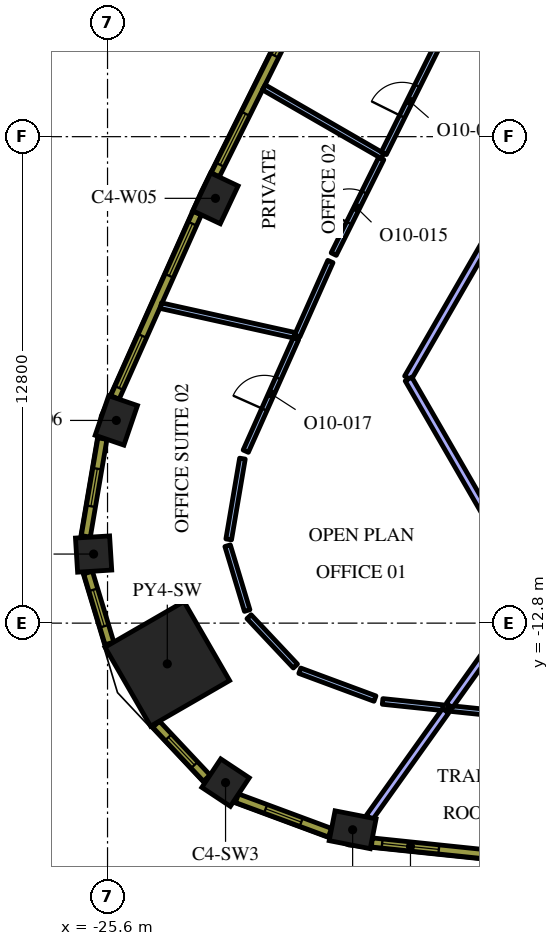
"""IFC4 building model, lengths in metres.
Left out: names, types, materials, properties, quantities, classifications, styles, units other than length and angle.
Written with IfcOpenShell. Run it as: python <this file> out.ifc"""

import sys

from ifc_helpers import new_model, si_unit, direction, frame, frame_2d, origin, origin_2d, place, context, subcontext, project, spatial, rectangle, extrude, element, fill, save


model = new_model("IFC4")
c1 = context("Model", 3, precision=1e-05, world=origin(), true_north=direction((0.0, 1.0)))
c2 = subcontext(c1, "Body", "Model", "MODEL_VIEW")
j1 = project(units=[si_unit("LENGTHUNIT", "METRE"), si_unit("PLANEANGLEUNIT", "RADIAN")], contexts=[c1])
p1 = place(None, origin())
s1 = spatial("IfcSite", under=j1, at=p1, CompositionType="ELEMENT")
p2 = place(p1, origin())
s2 = spatial("IfcBuilding", under=s1, at=p2, CompositionType="ELEMENT")
p3 = place(p2, frame((0.0, 0.0, 252.0)))
s3 = spatial("IfcBuildingStorey", under=s2, at=p3, CompositionType="ELEMENT", Elevation=252.0)
p4 = place(p3, frame((-24.027, -13.872, 0.0), z_axis=(0.0, 0.0, 1.0), x_axis=(-0.866025403784, -0.5, 0.0)))
e1 = element("IfcColumn", 1, at=p4, inside=s3, PredefinedType="COLUMN", context=c2, shape_type="SweptSolid", body=[
    extrude(rectangle(XDim=2.4, YDim=2.4, at=origin_2d()), origin(), (0.0, 0.0, 1.0), 4.2),
])
for number, where, z_axis, x_axis in (
    (2, (-19.15, -18.237, 0.0), (0.0, 0.0, 1.0), (0.981, -0.192, 0.0)),
    (3, (-22.76, -1.623, 0.0), (0.0, 0.0, 1.0), (-0.426, -0.905, 0.0)),
    (4, (-25.369, -7.466, 0.0), (0.0, 0.0, 1.0), (-0.324, -0.946, 0.0)),
):
    element("IfcColumn", number, at=place(p3, frame(where, z_axis=z_axis, x_axis=x_axis)), inside=s3, PredefinedType="COLUMN", context=c2, shape_type="SweptSolid", body=[
        extrude(rectangle(XDim=1.1, YDim=0.8, at=origin_2d()), origin(), (0.0, 0.0, 1.0), 4.2),
    ])
for number, where, z_axis, x_axis in (
    (5, (-25.967, -10.982, 0.0), (0.0, 0.0, 1.0), (0.062, -0.998, 0.0)),
    (6, (-22.494, -16.997, 0.0), (0.0, 0.0, 1.0), (0.833, -0.553, 0.0)),
):
    element("IfcColumn", number, at=place(p3, frame(where, z_axis=z_axis, x_axis=x_axis)), inside=s3, PredefinedType="COLUMN", context=c2, shape_type="SweptSolid", body=[
        extrude(rectangle(XDim=0.9, YDim=0.9, at=origin_2d()), origin(), (0.0, 0.0, 1.0), 4.2),
    ])
p5 = place(p3, frame((-12.5, -15.471, 0.0), z_axis=(0.0, 0.0, 1.0), x_axis=(-0.99462267413, 0.103565129778, 0.0)))
e7 = element("IfcWall", 7, at=p5, inside=s3, PredefinedType="PARTITIONING", context=c2, shape_type="SweptSolid", body=[
    extrude(rectangle(XDim=4.177, YDim=0.15, at=frame_2d((2.089, 0.0))), origin(), (0.0, 0.0, 1.0), 3.4),
])
p6 = place(p5, frame((1.677, 0.0, 0.0)))
e8 = element("IfcOpeningElement", 8, at=p6, cuts=e7, PredefinedType="OPENING", context=c2, shape_type="SweptSolid", body=[
    extrude(rectangle(XDim=0.9, YDim=2.1, at=frame_2d((0.45, 1.05))), frame((0.0, 0.085, 0.0), z_axis=(0.0, -1.0, 0.0), x_axis=(1.0, 0.0, 0.0)), (0.0, 0.0, 1.0), 0.17),
])
p7 = place(p3, frame((-18.709, -17.916, 0.0), z_axis=(0.0, 0.0, 1.0), x_axis=(0.581023923954, 0.813886478444, 0.0)))
e9 = element("IfcWall", 9, at=p7, inside=s3, PredefinedType="PARTITIONING", context=c2, shape_type="SweptSolid", body=[
    extrude(rectangle(XDim=3.449, YDim=0.2, at=frame_2d((1.725, 0.0))), origin(), (0.0, 0.0, 1.0), 3.4),
])
p8 = place(p3, frame((-16.604, -14.968, 0.0), z_axis=(0.0, 0.0, 1.0), x_axis=(0.581000735813, 0.813903031684, 0.0)))
e10 = element("IfcWall", 10, at=p8, inside=s3, PredefinedType="PARTITIONING", context=c2, shape_type="SweptSolid", body=[
    extrude(rectangle(XDim=3.696, YDim=0.2, at=frame_2d((1.848, 0.0))), origin(), (0.0, 0.0, 1.0), 3.4),
])
p9 = place(p3, frame((-18.363, -0.506, 0.0), z_axis=(0.0, 0.0, 1.0), x_axis=(-0.866048087663, 0.499960708312, 0.0)))
e11 = element("IfcWall", 11, at=p9, inside=s3, PredefinedType="PARTITIONING", context=c2, shape_type="SweptSolid", body=[
    extrude(rectangle(XDim=3.607, YDim=0.15, at=frame_2d((1.804, 0.0))), origin(), (0.0, 0.0, 1.0), 3.4),
])
p10 = place(p3, frame((-18.33, -0.438, 0.0), z_axis=(0.0, 0.0, 1.0), x_axis=(0.445184199442, 0.895439014432, 0.0)))
e12 = element("IfcWall", 12, at=p10, inside=s3, PredefinedType="PARTITIONING", context=c2, shape_type="SweptSolid", body=[
    extrude(rectangle(XDim=3.082, YDim=0.15, at=frame_2d((1.541, 0.0))), origin(), (0.0, 0.0, 1.0), 3.4),
])
p11 = place(p10, frame((1.081, 0.0, 0.0)))
e13 = element("IfcOpeningElement", 13, at=p11, cuts=e12, PredefinedType="OPENING", context=c2, shape_type="SweptSolid", body=[
    extrude(rectangle(XDim=0.9, YDim=2.1, at=frame_2d((0.45, 1.05))), frame((0.0, 0.085, 0.0), z_axis=(0.0, -1.0, 0.0), x_axis=(1.0, 0.0, 0.0)), (0.0, 0.0, 1.0), 0.17),
])
p12 = place(p3, frame((-19.648, -3.09, 0.0), z_axis=(0.0, 0.0, 1.0), x_axis=(0.445162501923, 0.89544980143, 0.0)))
e14 = element("IfcWall", 14, at=p12, inside=s3, PredefinedType="PARTITIONING", context=c2, shape_type="SweptSolid", body=[
    extrude(rectangle(XDim=2.811, YDim=0.15, at=frame_2d((1.405, 0.0))), origin(), (0.0, 0.0, 1.0), 3.4),
])
p13 = place(p12, frame((0.911, 0.0, 0.0)))
e15 = element("IfcOpeningElement", 15, at=p13, cuts=e14, PredefinedType="OPENING", context=c2, shape_type="SweptSolid", body=[
    extrude(rectangle(XDim=0.9, YDim=2.1, at=frame_2d((0.45, 1.05))), frame((0.0, 0.085, 0.0), z_axis=(0.0, -1.0, 0.0), x_axis=(1.0, 0.0, 0.0)), (0.0, 0.0, 1.0), 0.17),
])
p14 = place(p3, frame((-19.735, -3.286, 0.0), z_axis=(0.0, 0.0, 1.0), x_axis=(-0.407596561527, -0.913162112131, 0.0)))
e16 = element("IfcWall", 16, at=p14, inside=s3, PredefinedType="PARTITIONING", context=c2, shape_type="SweptSolid", body=[
    extrude(rectangle(XDim=2.143, YDim=0.15, at=frame_2d((1.072, 0.0))), origin(), (0.0, 0.0, 1.0), 3.4),
])
p15 = place(p3, frame((-20.684, -5.226, 0.0), z_axis=(0.0, 0.0, 1.0), x_axis=(-0.976260449593, 0.216599941274, 0.0)))
e17 = element("IfcWall", 17, at=p15, inside=s3, PredefinedType="PARTITIONING", context=c2, shape_type="SweptSolid", body=[
    extrude(rectangle(XDim=3.598, YDim=0.15, at=frame_2d((1.799, 0.0))), origin(), (0.0, 0.0, 1.0), 3.4),
])
p16 = place(p3, frame((-16.769, -15.026, 0.0), z_axis=(0.0, 0.0, 1.0), x_axis=(-0.994627569422, 0.103518105401, 0.0)))
e18 = element("IfcWall", 18, at=p16, inside=s3, PredefinedType="PARTITIONING", context=c2, shape_type="SweptSolid", body=[
    extrude(rectangle(XDim=1.601, YDim=0.15, at=frame_2d((0.801, 0.0))), origin(), (0.0, 0.0, 1.0), 3.4),
])
p17 = place(p3, frame((-18.562, -14.786, 0.0), z_axis=(0.0, 0.0, 1.0), x_axis=(-0.937602119917, 0.347710029662, 0.0)))
e19 = element("IfcWall", 19, at=p17, inside=s3, PredefinedType="PARTITIONING", context=c2, shape_type="SweptSolid", body=[
    extrude(rectangle(XDim=2.11, YDim=0.15, at=frame_2d((1.055, 0.0))), origin(), (0.0, 0.0, 1.0), 3.4),
])
p18 = place(p3, frame((-20.656, -13.929, 0.0), z_axis=(0.0, 0.0, 1.0), x_axis=(-0.684710738871, 0.728814931293, 0.0)))
e20 = element("IfcWall", 20, at=p18, inside=s3, PredefinedType="PARTITIONING", context=c2, shape_type="SweptSolid", body=[
    extrude(rectangle(XDim=1.782, YDim=0.15, at=frame_2d((0.891, 0.0))), origin(), (0.0, 0.0, 1.0), 3.4),
])
p19 = place(p3, frame((-21.925, -12.469, 0.0), z_axis=(0.0, 0.0, 1.0), x_axis=(-0.288767705809, 0.957399191603, 0.0)))
e21 = element("IfcWall", 21, at=p19, inside=s3, PredefinedType="PARTITIONING", context=c2, shape_type="SweptSolid", body=[
    extrude(rectangle(XDim=1.782, YDim=0.15, at=frame_2d((0.891, 0.0))), origin(), (0.0, 0.0, 1.0), 3.4),
])
p20 = place(p3, frame((-22.412, -10.597, 0.0), z_axis=(0.0, 0.0, 1.0), x_axis=(0.167612004459, 0.985853039738, 0.0)))
e22 = element("IfcWall", 22, at=p20, inside=s3, PredefinedType="PARTITIONING", context=c2, shape_type="SweptSolid", body=[
    extrude(rectangle(XDim=2.156, YDim=0.15, at=frame_2d((1.078, 0.0))), origin(), (0.0, 0.0, 1.0), 3.4),
])
p21 = place(p3, frame((-21.963, -8.276, 0.0), z_axis=(0.0, 0.0, 1.0), x_axis=(0.407560214661, 0.913178334952, 0.0)))
e23 = element("IfcWall", 23, at=p21, inside=s3, PredefinedType="PARTITIONING", context=c2, shape_type="SweptSolid", body=[
    extrude(rectangle(XDim=3.249, YDim=0.15, at=frame_2d((1.625, 0.0))), origin(), (0.0, 0.0, 1.0), 3.4),
])
p22 = place(p21, frame((1.2, 0.0, 0.0)))
e24 = element("IfcOpeningElement", 24, at=p22, cuts=e23, PredefinedType="OPENING", context=c2, shape_type="SweptSolid", body=[
    extrude(rectangle(XDim=0.9, YDim=2.1, at=frame_2d((0.45, 1.05))), frame((0.0, 0.085, 0.0), z_axis=(0.0, -1.0, 0.0), x_axis=(1.0, 0.0, 0.0)), (0.0, 0.0, 1.0), 0.17),
])
p23 = place(p3, frame((-13.537, 0.853, 0.0), z_axis=(0.0, 0.0, 1.0), x_axis=(-0.500009576767, -0.866019874565, 0.0)))
e25 = element("IfcWall", 25, at=p23, inside=s3, PredefinedType="PARTITIONING", context=c2, shape_type="SweptSolid", body=[
    extrude(rectangle(XDim=8.317, YDim=0.2, at=frame_2d((4.159, 0.0))), origin(), (0.0, 0.0, 1.0), 3.4),
])
p24 = place(p3, frame((-17.681, -6.376, 0.0), z_axis=(0.0, 0.0, 1.0), x_axis=(0.500017005442, -0.866015585465, 0.0)))
e26 = element("IfcWall", 26, at=p24, inside=s3, PredefinedType="PARTITIONING", context=c2, shape_type="SweptSolid", body=[
    extrude(rectangle(XDim=6.338, YDim=0.2, at=frame_2d((3.169, 0.0))), origin(), (0.0, 0.0, 1.0), 3.4),
])
p25 = place(p3, frame((-18.644, -18.571, 0.0), z_axis=(0.0, 0.0, 1.0), x_axis=(0.994621961215, -0.103571976272, 0.0)))
e27 = element("IfcWall", 27, at=p25, inside=s3, PredefinedType="SOLIDWALL", context=c2, shape_type="SweptSolid", body=[
    extrude(rectangle(XDim=5.311, YDim=0.24, at=frame_2d((2.655, 0.0))), origin(), (0.0, 0.0, 1.0), 3.9),
])
p26 = place(p25, frame((0.271, 0.0, 0.9)))
e28 = element("IfcOpeningElement", 28, at=p26, cuts=e27, PredefinedType="OPENING", context=c2, shape_type="SweptSolid", body=[
    extrude(rectangle(XDim=1.5, YDim=2.55, at=frame_2d((0.75, 1.275))), frame((0.0, 0.13, 0.0), z_axis=(0.0, -1.0, 0.0), x_axis=(1.0, 0.0, 0.0)), (0.0, 0.0, 1.0), 0.26),
])
p27 = place(p25, frame((3.504, 0.0, 0.9)))
e29 = element("IfcOpeningElement", 29, at=p27, cuts=e27, PredefinedType="OPENING", context=c2, shape_type="SweptSolid", body=[
    extrude(rectangle(XDim=1.5, YDim=2.55, at=frame_2d((0.75, 1.275))), frame((0.0, 0.13, 0.0), z_axis=(0.0, -1.0, 0.0), x_axis=(1.0, 0.0, 0.0)), (0.0, 0.0, 1.0), 0.26),
])
p28 = place(p3, frame((-20.407, 3.74, 0.0), z_axis=(0.0, 0.0, 1.0), x_axis=(-0.445129582031, -0.895466166419, 0.0)))
e30 = element("IfcWall", 30, at=p28, inside=s3, PredefinedType="SOLIDWALL", context=c2, shape_type="SweptSolid", body=[
    extrude(rectangle(XDim=5.298, YDim=0.24, at=frame_2d((2.649, 0.0))), origin(), (0.0, 0.0, 1.0), 3.9),
])
p29 = place(p28, frame((0.295, 0.0, 0.9)))
e31 = element("IfcOpeningElement", 31, at=p29, cuts=e30, PredefinedType="OPENING", context=c2, shape_type="SweptSolid", body=[
    extrude(rectangle(XDim=1.5, YDim=2.55, at=frame_2d((0.75, 1.275))), frame((0.0, 0.13, 0.0), z_axis=(0.0, -1.0, 0.0), x_axis=(1.0, 0.0, 0.0)), (0.0, 0.0, 1.0), 0.26),
])
p30 = place(p28, frame((3.504, 0.0, 0.9)))
e32 = element("IfcOpeningElement", 32, at=p30, cuts=e30, PredefinedType="OPENING", context=c2, shape_type="SweptSolid", body=[
    extrude(rectangle(XDim=1.5, YDim=2.55, at=frame_2d((0.75, 1.275))), frame((0.0, 0.13, 0.0), z_axis=(0.0, -1.0, 0.0), x_axis=(1.0, 0.0, 0.0)), (0.0, 0.0, 1.0), 0.26),
])
p31 = place(p3, frame((-23.24, -2.011, 0.0), z_axis=(0.0, 0.0, 1.0), x_axis=(-0.407579651789, -0.913169659728, 0.0)))
e33 = element("IfcWall", 33, at=p31, inside=s3, PredefinedType="SOLIDWALL", context=c2, shape_type="SweptSolid", body=[
    extrude(rectangle(XDim=5.311, YDim=0.24, at=frame_2d((2.655, 0.0))), origin(), (0.0, 0.0, 1.0), 3.9),
])
p32 = place(p31, frame((0.306, 0.0, 0.9)))
e34 = element("IfcOpeningElement", 34, at=p32, cuts=e33, PredefinedType="OPENING", context=c2, shape_type="SweptSolid", body=[
    extrude(rectangle(XDim=1.5, YDim=2.55, at=frame_2d((0.75, 1.275))), frame((0.0, 0.13, 0.0), z_axis=(0.0, -1.0, 0.0), x_axis=(1.0, 0.0, 0.0)), (0.0, 0.0, 1.0), 0.26),
])
p33 = place(p31, frame((3.539, 0.0, 0.9)))
e35 = element("IfcOpeningElement", 35, at=p33, cuts=e33, PredefinedType="OPENING", context=c2, shape_type="SweptSolid", body=[
    extrude(rectangle(XDim=1.5, YDim=2.55, at=frame_2d((0.75, 1.275))), frame((0.0, 0.13, 0.0), z_axis=(0.0, -1.0, 0.0), x_axis=(1.0, 0.0, 0.0)), (0.0, 0.0, 1.0), 0.26),
])
p34 = place(p3, frame((-25.734, -7.945, 0.0), z_axis=(0.0, 0.0, 1.0), x_axis=(-0.167660055546, -0.985844869021, 0.0)))
e36 = element("IfcWall", 36, at=p34, inside=s3, PredefinedType="SOLIDWALL", context=c2, shape_type="SweptSolid", body=[
    extrude(rectangle(XDim=2.609, YDim=0.24, at=frame_2d((1.305, 0.0))), origin(), (0.0, 0.0, 1.0), 3.9),
])
p35 = place(p34, frame((0.805, 0.0, 0.9)))
e37 = element("IfcOpeningElement", 37, at=p35, cuts=e36, PredefinedType="OPENING", context=c2, shape_type="SweptSolid", body=[
    extrude(rectangle(XDim=1.0, YDim=2.55, at=frame_2d((0.5, 1.275))), frame((0.0, 0.13, 0.0), z_axis=(0.0, -1.0, 0.0), x_axis=(1.0, 0.0, 0.0)), (0.0, 0.0, 1.0), 0.26),
])
p36 = place(p3, frame((-26.112, -11.469, 0.0), z_axis=(0.0, 0.0, 1.0), x_axis=(0.288727209095, -0.957411405159, 0.0)))
e38 = element("IfcWall", 38, at=p36, inside=s3, PredefinedType="SOLIDWALL", context=c2, shape_type="SweptSolid", body=[
    extrude(rectangle(XDim=1.948, YDim=0.24, at=frame_2d((0.974, 0.0))), origin(), (0.0, 0.0, 1.0), 3.9),
])
p37 = place(p36, frame((0.474, 0.0, 0.9)))
e39 = element("IfcOpeningElement", 39, at=p37, cuts=e38, PredefinedType="OPENING", context=c2, shape_type="SweptSolid", body=[
    extrude(rectangle(XDim=1.0, YDim=2.55, at=frame_2d((0.5, 1.275))), frame((0.0, 0.13, 0.0), z_axis=(0.0, -1.0, 0.0), x_axis=(1.0, 0.0, 0.0)), (0.0, 0.0, 1.0), 0.26),
])
p38 = place(p3, frame((-24.323, -15.459, 0.0), z_axis=(0.0, 0.0, 1.0), x_axis=(0.684770274166, -0.728758994194, 0.0)))
e40 = element("IfcWall", 40, at=p38, inside=s3, PredefinedType="SOLIDWALL", context=c2, shape_type="SweptSolid", body=[
    extrude(rectangle(XDim=1.948, YDim=0.24, at=frame_2d((0.974, 0.0))), origin(), (0.0, 0.0, 1.0), 3.9),
])
p39 = place(p38, frame((0.474, 0.0, 0.9)))
e41 = element("IfcOpeningElement", 41, at=p39, cuts=e40, PredefinedType="OPENING", context=c2, shape_type="SweptSolid", body=[
    extrude(rectangle(XDim=1.0, YDim=2.55, at=frame_2d((0.5, 1.275))), frame((0.0, 0.13, 0.0), z_axis=(0.0, -1.0, 0.0), x_axis=(1.0, 0.0, 0.0)), (0.0, 0.0, 1.0), 0.26),
])
p40 = place(p3, frame((-22.194, -17.406, 0.0), z_axis=(0.0, 0.0, 1.0), x_axis=(0.937569171184, -0.347798863203, 0.0)))
e42 = element("IfcWall", 42, at=p40, inside=s3, PredefinedType="SOLIDWALL", context=c2, shape_type="SweptSolid", body=[
    extrude(rectangle(XDim=2.609, YDim=0.24, at=frame_2d((1.305, 0.0))), origin(), (0.0, 0.0, 1.0), 3.9),
])
p41 = place(p40, frame((0.805, 0.0, 0.9)))
e43 = element("IfcOpeningElement", 43, at=p41, cuts=e42, PredefinedType="OPENING", context=c2, shape_type="SweptSolid", body=[
    extrude(rectangle(XDim=1.0, YDim=2.55, at=frame_2d((0.5, 1.275))), frame((0.0, 0.13, 0.0), z_axis=(0.0, -1.0, 0.0), x_axis=(1.0, 0.0, 0.0)), (0.0, 0.0, 1.0), 0.26),
])
p42 = place(p11, origin())
e44 = element("IfcDoor", 44, at=p42, inside=s3, OperationType="SINGLE_SWING_LEFT", PredefinedType="DOOR", context=c2, shape_type="SweptSolid", body=[
    extrude(rectangle(XDim=0.9, YDim=2.1, at=frame_2d((0.45, 1.05))), frame((0.0, 0.025, 0.0), z_axis=(0.0, -1.0, 0.0), x_axis=(1.0, 0.0, 0.0)), (0.0, 0.0, 1.0), 0.05),
])
fill(e13, e44)
p43 = place(p13, origin())
e45 = element("IfcDoor", 45, at=p43, inside=s3, OperationType="SINGLE_SWING_LEFT", PredefinedType="DOOR", context=c2, shape_type="SweptSolid", body=[
    extrude(rectangle(XDim=0.9, YDim=2.1, at=frame_2d((0.45, 1.05))), frame((0.0, 0.025, 0.0), z_axis=(0.0, -1.0, 0.0), x_axis=(1.0, 0.0, 0.0)), (0.0, 0.0, 1.0), 0.05),
])
fill(e15, e45)
p44 = place(p22, origin())
e46 = element("IfcDoor", 46, at=p44, inside=s3, OperationType="SINGLE_SWING_RIGHT", PredefinedType="DOOR", context=c2, shape_type="SweptSolid", body=[
    extrude(rectangle(XDim=0.9, YDim=2.1, at=frame_2d((0.45, 1.05))), frame((0.0, 0.025, 0.0), z_axis=(0.0, -1.0, 0.0), x_axis=(1.0, 0.0, 0.0)), (0.0, 0.0, 1.0), 0.05),
])
fill(e24, e46)
p45 = place(p26, origin())
e47 = element("IfcWindow", 47, at=p45, inside=s3, PartitioningType="SINGLE_PANEL", PredefinedType="WINDOW", context=c2, shape_type="SweptSolid", body=[
    extrude(rectangle(XDim=1.5, YDim=2.55, at=frame_2d((0.75, 1.275))), frame((0.0, 0.04, 0.0), z_axis=(0.0, -1.0, 0.0), x_axis=(1.0, 0.0, 0.0)), (0.0, 0.0, 1.0), 0.06),
])
fill(e28, e47)
p46 = place(p29, origin())
e48 = element("IfcWindow", 48, at=p46, inside=s3, PartitioningType="SINGLE_PANEL", PredefinedType="WINDOW", context=c2, shape_type="SweptSolid", body=[
    extrude(rectangle(XDim=1.5, YDim=2.55, at=frame_2d((0.75, 1.275))), frame((0.0, 0.04, 0.0), z_axis=(0.0, -1.0, 0.0), x_axis=(1.0, 0.0, 0.0)), (0.0, 0.0, 1.0), 0.06),
])
fill(e31, e48)
p47 = place(p30, origin())
e49 = element("IfcWindow", 49, at=p47, inside=s3, PartitioningType="SINGLE_PANEL", PredefinedType="WINDOW", context=c2, shape_type="SweptSolid", body=[
    extrude(rectangle(XDim=1.5, YDim=2.55, at=frame_2d((0.75, 1.275))), frame((0.0, 0.04, 0.0), z_axis=(0.0, -1.0, 0.0), x_axis=(1.0, 0.0, 0.0)), (0.0, 0.0, 1.0), 0.06),
])
fill(e32, e49)
p48 = place(p32, origin())
e50 = element("IfcWindow", 50, at=p48, inside=s3, PartitioningType="SINGLE_PANEL", PredefinedType="WINDOW", context=c2, shape_type="SweptSolid", body=[
    extrude(rectangle(XDim=1.5, YDim=2.55, at=frame_2d((0.75, 1.275))), frame((0.0, 0.04, 0.0), z_axis=(0.0, -1.0, 0.0), x_axis=(1.0, 0.0, 0.0)), (0.0, 0.0, 1.0), 0.06),
])
fill(e34, e50)
p49 = place(p33, origin())
e51 = element("IfcWindow", 51, at=p49, inside=s3, PartitioningType="SINGLE_PANEL", PredefinedType="WINDOW", context=c2, shape_type="SweptSolid", body=[
    extrude(rectangle(XDim=1.5, YDim=2.55, at=frame_2d((0.75, 1.275))), frame((0.0, 0.04, 0.0), z_axis=(0.0, -1.0, 0.0), x_axis=(1.0, 0.0, 0.0)), (0.0, 0.0, 1.0), 0.06),
])
fill(e35, e51)
p50 = place(p35, origin())
e52 = element("IfcWindow", 52, at=p50, inside=s3, PartitioningType="SINGLE_PANEL", PredefinedType="WINDOW", context=c2, shape_type="SweptSolid", body=[
    extrude(rectangle(XDim=1.0, YDim=2.55, at=frame_2d((0.5, 1.275))), frame((0.0, 0.04, 0.0), z_axis=(0.0, -1.0, 0.0), x_axis=(1.0, 0.0, 0.0)), (0.0, 0.0, 1.0), 0.06),
])
fill(e37, e52)
p51 = place(p37, origin())
e53 = element("IfcWindow", 53, at=p51, inside=s3, PartitioningType="SINGLE_PANEL", PredefinedType="WINDOW", context=c2, shape_type="SweptSolid", body=[
    extrude(rectangle(XDim=1.0, YDim=2.55, at=frame_2d((0.5, 1.275))), frame((0.0, 0.04, 0.0), z_axis=(0.0, -1.0, 0.0), x_axis=(1.0, 0.0, 0.0)), (0.0, 0.0, 1.0), 0.06),
])
fill(e39, e53)
p52 = place(p39, origin())
e54 = element("IfcWindow", 54, at=p52, inside=s3, PartitioningType="SINGLE_PANEL", PredefinedType="WINDOW", context=c2, shape_type="SweptSolid", body=[
    extrude(rectangle(XDim=1.0, YDim=2.55, at=frame_2d((0.5, 1.275))), frame((0.0, 0.04, 0.0), z_axis=(0.0, -1.0, 0.0), x_axis=(1.0, 0.0, 0.0)), (0.0, 0.0, 1.0), 0.06),
])
fill(e41, e54)
p53 = place(p41, origin())
e55 = element("IfcWindow", 55, at=p53, inside=s3, PartitioningType="SINGLE_PANEL", PredefinedType="WINDOW", context=c2, shape_type="SweptSolid", body=[
    extrude(rectangle(XDim=1.0, YDim=2.55, at=frame_2d((0.5, 1.275))), frame((0.0, 0.04, 0.0), z_axis=(0.0, -1.0, 0.0), x_axis=(1.0, 0.0, 0.0)), (0.0, 0.0, 1.0), 0.06),
])
fill(e43, e55)
save(model, sys.argv[1])
